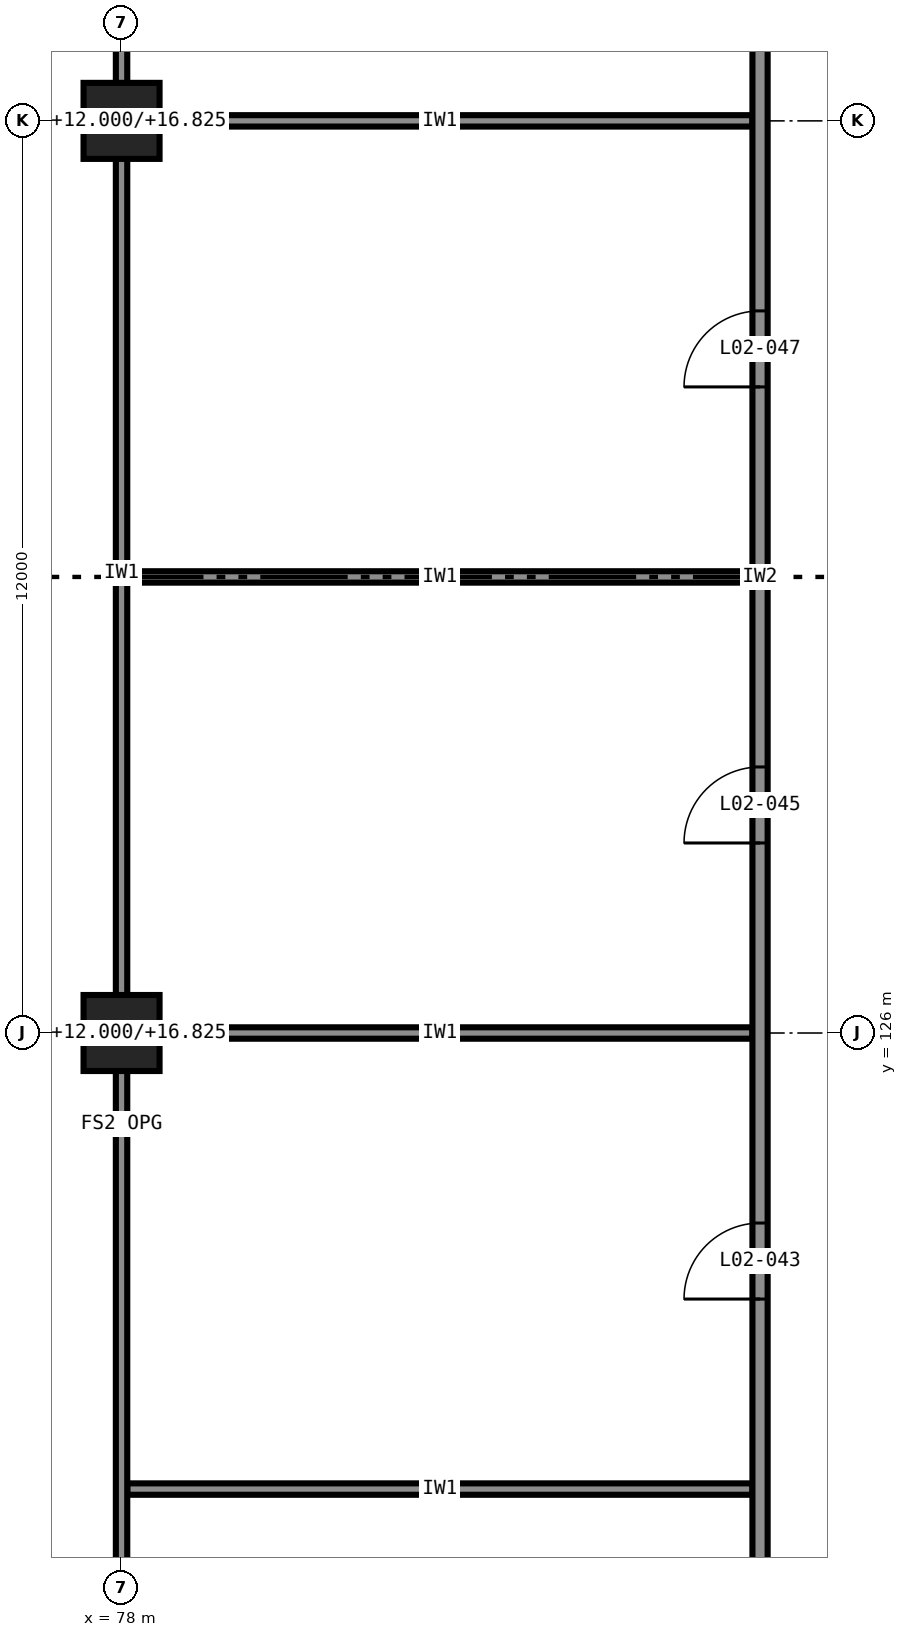
"""IFC4 building model, lengths in metres.
Left out: names, types, materials, properties, quantities, classifications, styles, units other than length and angle.
Written with IfcOpenShell. Run it as: python <this file> out.ifc"""

import sys

from ifc_helpers import new_model, si_unit, direction, frame, frame_2d, origin, origin_2d, place, context, subcontext, project, spatial, rectangle, extrude, element, fill, save


model = new_model("IFC4")
c1 = context("Model", 3, precision=1e-05, world=origin(), true_north=direction((0.0, 1.0)))
c2 = subcontext(c1, "Body", "Model", "MODEL_VIEW")
j1 = project(units=[si_unit("LENGTHUNIT", "METRE"), si_unit("PLANEANGLEUNIT", "RADIAN")], contexts=[c1])
p1 = place(None, origin())
s1 = spatial("IfcSite", under=j1, at=p1, CompositionType="ELEMENT")
p2 = place(p1, origin())
s2 = spatial("IfcBuilding", under=s1, at=p2, CompositionType="ELEMENT")
p3 = place(p2, frame((0.0, 0.0, 12.0)))
s3 = spatial("IfcBuildingStorey", under=s2, at=p3, CompositionType="ELEMENT", Elevation=12.0)
for number, where, z_axis, x_axis in (
    (1, (78.0, 126.0, 0.0), (0.0, 0.0, 1.0), (1.0, 0.0, 0.0)),
    (2, (78.0, 138.0, 0.0), (0.0, 0.0, 1.0), (1.0, 0.0, 0.0)),
):
    element("IfcColumn", number, at=place(p3, frame(where, z_axis=z_axis, x_axis=x_axis)), inside=s3, PredefinedType="COLUMN", context=c2, shape_type="SweptSolid", body=[
        extrude(rectangle(XDim=1.0, YDim=1.0, at=origin_2d()), origin(), (0.0, 0.0, 1.0), 4.825),
    ])
for number, where, z_axis, x_axis in (
    (3, (78.075, 120.0, 0.0), (0.0, 0.0, 1.0), (1.0, 0.0, 0.0)),
    (4, (78.075, 126.0, 0.0), (0.0, 0.0, 1.0), (1.0, 0.0, 0.0)),
    (5, (78.075, 132.0, 0.0), (0.0, 0.0, 1.0), (1.0, 0.0, 0.0)),
    (6, (78.075, 138.0, 0.0), (0.0, 0.0, 1.0), (1.0, 0.0, 0.0)),
):
    element("IfcWall", number, at=place(p3, frame(where, z_axis=z_axis, x_axis=x_axis)), inside=s3, PredefinedType="PARTITIONING", context=c2, shape_type="SweptSolid", body=[
        extrude(rectangle(XDim=8.225, YDim=0.15, at=frame_2d((4.113, 0.0))), origin(), (0.0, 0.0, 1.0), 4.825),
    ])
p4 = place(p3, frame((78.0, 114.1, 0.0), z_axis=(0.0, 0.0, 1.0), x_axis=(0.0, 1.0, 0.0)))
e7 = element("IfcWall", 7, at=p4, inside=s3, PredefinedType="PARTITIONING", context=c2, shape_type="SweptSolid", body=[
    extrude(rectangle(XDim=35.9, YDim=0.15, at=frame_2d((17.95, 0.0))), origin(), (0.0, 0.0, 1.0), 4.825),
])
p5 = place(p3, frame((86.4, 114.0, 0.0), z_axis=(0.0, 0.0, 1.0), x_axis=(0.0, 1.0, 0.0)))
e8 = element("IfcWall", 8, at=p5, inside=s3, PredefinedType="PARTITIONING", context=c2, shape_type="SweptSolid", body=[
    extrude(rectangle(XDim=36.0, YDim=0.2, at=frame_2d((18.0, 0.0))), origin(), (0.0, 0.0, 1.0), 4.825),
])
p6 = place(p5, frame((2.5, 0.0, 0.0)))
e9 = element("IfcOpeningElement", 9, at=p6, cuts=e8, PredefinedType="OPENING", context=c2, shape_type="SweptSolid", body=[
    extrude(rectangle(XDim=1.0, YDim=2.1, at=frame_2d((0.5, 1.05))), frame((0.0, 0.11, 0.0), z_axis=(0.0, -1.0, 0.0), x_axis=(1.0, 0.0, 0.0)), (0.0, 0.0, 1.0), 0.22),
])
p7 = place(p5, frame((8.5, 0.0, 0.0)))
e10 = element("IfcOpeningElement", 10, at=p7, cuts=e8, PredefinedType="OPENING", context=c2, shape_type="SweptSolid", body=[
    extrude(rectangle(XDim=1.0, YDim=2.1, at=frame_2d((0.5, 1.05))), frame((0.0, 0.11, 0.0), z_axis=(0.0, -1.0, 0.0), x_axis=(1.0, 0.0, 0.0)), (0.0, 0.0, 1.0), 0.22),
])
p8 = place(p5, frame((14.5, 0.0, 0.0)))
e11 = element("IfcOpeningElement", 11, at=p8, cuts=e8, PredefinedType="OPENING", context=c2, shape_type="SweptSolid", body=[
    extrude(rectangle(XDim=1.0, YDim=2.1, at=frame_2d((0.5, 1.05))), frame((0.0, 0.11, 0.0), z_axis=(0.0, -1.0, 0.0), x_axis=(1.0, 0.0, 0.0)), (0.0, 0.0, 1.0), 0.22),
])
p9 = place(p5, frame((20.5, 0.0, 0.0)))
e12 = element("IfcOpeningElement", 12, at=p9, cuts=e8, PredefinedType="OPENING", context=c2, shape_type="SweptSolid", body=[
    extrude(rectangle(XDim=1.0, YDim=2.1, at=frame_2d((0.5, 1.05))), frame((0.0, 0.11, 0.0), z_axis=(0.0, -1.0, 0.0), x_axis=(1.0, 0.0, 0.0)), (0.0, 0.0, 1.0), 0.22),
])
p10 = place(p5, frame((26.5, 0.0, 0.0)))
e13 = element("IfcOpeningElement", 13, at=p10, cuts=e8, PredefinedType="OPENING", context=c2, shape_type="SweptSolid", body=[
    extrude(rectangle(XDim=1.0, YDim=2.1, at=frame_2d((0.5, 1.05))), frame((0.0, 0.11, 0.0), z_axis=(0.0, -1.0, 0.0), x_axis=(1.0, 0.0, 0.0)), (0.0, 0.0, 1.0), 0.22),
])
p11 = place(p5, frame((32.5, 0.0, 0.0)))
e14 = element("IfcOpeningElement", 14, at=p11, cuts=e8, PredefinedType="OPENING", context=c2, shape_type="SweptSolid", body=[
    extrude(rectangle(XDim=1.0, YDim=2.1, at=frame_2d((0.5, 1.05))), frame((0.0, 0.11, 0.0), z_axis=(0.0, -1.0, 0.0), x_axis=(1.0, 0.0, 0.0)), (0.0, 0.0, 1.0), 0.22),
])
p12 = place(p7, origin())
e15 = element("IfcDoor", 15, at=p12, inside=s3, OperationType="SINGLE_SWING_RIGHT", PredefinedType="DOOR", context=c2, shape_type="SweptSolid", body=[
    extrude(rectangle(XDim=1.0, YDim=2.1, at=frame_2d((0.5, 1.05))), frame((0.0, 0.025, 0.0), z_axis=(0.0, -1.0, 0.0), x_axis=(1.0, 0.0, 0.0)), (0.0, 0.0, 1.0), 0.05),
])
fill(e10, e15)
p13 = place(p8, origin())
e16 = element("IfcDoor", 16, at=p13, inside=s3, OperationType="SINGLE_SWING_RIGHT", PredefinedType="DOOR", context=c2, shape_type="SweptSolid", body=[
    extrude(rectangle(XDim=1.0, YDim=2.1, at=frame_2d((0.5, 1.05))), frame((0.0, 0.025, 0.0), z_axis=(0.0, -1.0, 0.0), x_axis=(1.0, 0.0, 0.0)), (0.0, 0.0, 1.0), 0.05),
])
fill(e11, e16)
p14 = place(p9, origin())
e17 = element("IfcDoor", 17, at=p14, inside=s3, OperationType="SINGLE_SWING_RIGHT", PredefinedType="DOOR", context=c2, shape_type="SweptSolid", body=[
    extrude(rectangle(XDim=1.0, YDim=2.1, at=frame_2d((0.5, 1.05))), frame((0.0, 0.025, 0.0), z_axis=(0.0, -1.0, 0.0), x_axis=(1.0, 0.0, 0.0)), (0.0, 0.0, 1.0), 0.05),
])
fill(e12, e17)
save(model, sys.argv[1])
